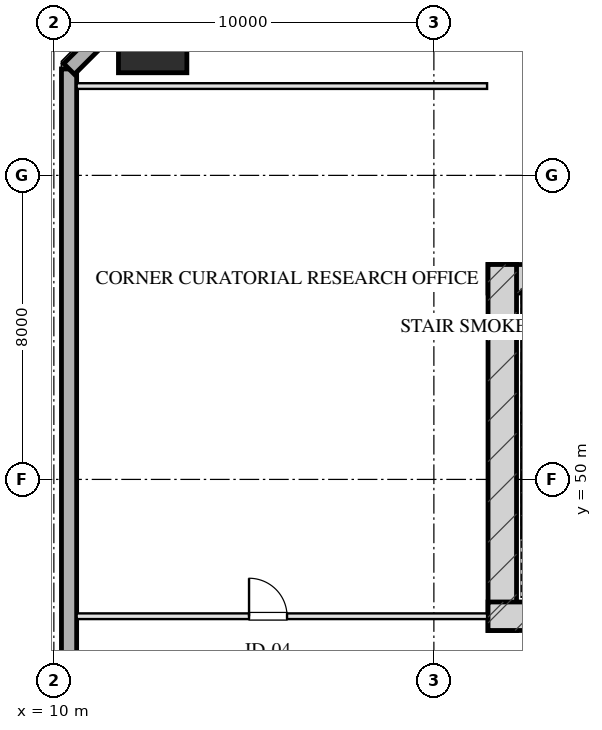
"""IFC4 building model, lengths in metres.
Left out: names, types, materials, properties, quantities, classifications, styles, units other than length and angle.
Written with IfcOpenShell. Run it as: python <this file> out.ifc"""

import sys

from ifc_helpers import new_model, si_unit, direction, frame, frame_2d, origin, origin_2d, place, context, subcontext, project, spatial, rectangle, hollow_rectangle, extrude, element, fill, save


model = new_model("IFC4")
c1 = context("Model", 3, precision=1e-05, world=origin(), true_north=direction((0.0, 1.0)))
c2 = subcontext(c1, "Body", "Model", "MODEL_VIEW")
j1 = project(units=[si_unit("LENGTHUNIT", "METRE"), si_unit("PLANEANGLEUNIT", "RADIAN")], contexts=[c1])
p1 = place(None, origin())
s1 = spatial("IfcSite", under=j1, at=p1, CompositionType="ELEMENT")
p2 = place(p1, origin())
s2 = spatial("IfcBuilding", under=s1, at=p2, CompositionType="ELEMENT")
p3 = place(p2, frame((0.0, 0.0, 42.0)))
s3 = spatial("IfcBuildingStorey", under=s2, at=p3, CompositionType="ELEMENT", Elevation=42.0)
p4 = place(p3, frame((21.425, 55.28, 0.0), z_axis=(0.0, 0.0, 1.0), x_axis=(1.0, 0.0, 0.0)))
e1 = element("IfcWall", 1, at=p4, inside=s3, PredefinedType="SHEAR", context=c2, shape_type="SweptSolid", body=[
    extrude(rectangle(XDim=17.15, YDim=0.75, at=frame_2d((8.575, 0.0))), origin(), (0.0, 0.0, 1.0), 4.0),
])
p5 = place(p3, frame((21.8, 46.025, 0.0), z_axis=(0.0, 0.0, 1.0), x_axis=(0.0, 1.0, 0.0)))
e2 = element("IfcWall", 2, at=p5, inside=s3, PredefinedType="SHEAR", context=c2, shape_type="SweptSolid", body=[
    extrude(rectangle(XDim=9.63, YDim=0.75, at=frame_2d((4.815, 0.0))), origin(), (0.0, 0.0, 1.0), 4.0),
])
p6 = place(p3, frame((21.425, 46.4, 0.0), z_axis=(0.0, 0.0, 1.0), x_axis=(1.0, 0.0, 0.0)))
e3 = element("IfcWall", 3, at=p6, inside=s3, PredefinedType="SHEAR", context=c2, shape_type="SweptSolid", body=[
    extrude(rectangle(XDim=4.295, YDim=0.75, at=frame_2d((2.147, 0.0))), origin(), (0.0, 0.0, 1.0), 4.0),
])
p7 = place(p3, frame((12.6, 61.6, 0.0), z_axis=(0.0, 0.0, 1.0), x_axis=(1.0, 0.0, 0.0)))
e4 = element("IfcColumn", 4, at=p7, inside=s3, PredefinedType="COLUMN", context=c2, shape_type="SweptSolid", body=[
    extrude(hollow_rectangle(XDim=1.8, YDim=1.8, WallThickness=0.06, at=origin_2d()), origin(), (0.0, 0.0, 1.0), 4.001),
])
p8 = place(p3, frame((10.4, 7.2, 0.0), z_axis=(0.0, 0.0, 1.0), x_axis=(0.0, 1.0, 0.0)))
e5 = element("IfcWall", 5, at=p8, inside=s3, PredefinedType="SOLIDWALL", context=c2, shape_type="SweptSolid", body=[
    extrude(rectangle(XDim=53.6, YDim=0.4, at=frame_2d((26.8, 0.0))), origin(), (0.0, 0.0, 1.0), 3.1),
])
p9 = place(p8, frame((28.15, 0.0, 0.75)))
e6 = element("IfcOpeningElement", 6, at=p9, cuts=e5, PredefinedType="OPENING", context=c2, shape_type="SweptSolid", body=[
    extrude(rectangle(XDim=2.5, YDim=1.75, at=frame_2d((1.25, 0.875))), frame((0.0, 0.21, 0.0), z_axis=(0.0, -1.0, 0.0), x_axis=(1.0, 0.0, 0.0)), (0.0, 0.0, 1.0), 0.42),
])
p10 = place(p3, frame((10.4, 60.8, 0.0), z_axis=(0.0, 0.0, 1.0), x_axis=(0.707106781187, 0.707106781187, 0.0)))
e7 = element("IfcWall", 7, at=p10, inside=s3, PredefinedType="SOLIDWALL", context=c2, shape_type="SweptSolid", body=[
    extrude(rectangle(XDim=4.243, YDim=0.4, at=frame_2d((2.121, 0.0))), origin(), (0.0, 0.0, 1.0), 3.1),
])
p11 = place(p3, frame((10.6, 60.35, 0.0), z_axis=(0.0, 0.0, 1.0), x_axis=(1.0, 0.0, 0.0)))
e8 = element("IfcWall", 8, at=p11, inside=s3, PredefinedType="PARTITIONING", context=c2, shape_type="SweptSolid", body=[
    extrude(rectangle(XDim=10.8, YDim=0.15, at=frame_2d((5.4, 0.0))), origin(), (0.0, 0.0, 1.0), 3.705),
])
p12 = place(p3, frame((10.6, 46.4, 0.0), z_axis=(0.0, 0.0, 1.0), x_axis=(1.0, 0.0, 0.0)))
e9 = element("IfcWall", 9, at=p12, inside=s3, PredefinedType="PARTITIONING", context=c2, shape_type="SweptSolid", body=[
    extrude(rectangle(XDim=10.8, YDim=0.15, at=frame_2d((5.4, 0.0))), origin(), (0.0, 0.0, 1.0), 3.705),
])
p13 = place(p12, frame((4.536, 0.0, 0.0)))
e10 = element("IfcOpeningElement", 10, at=p13, cuts=e9, PredefinedType="OPENING", context=c2, shape_type="SweptSolid", body=[
    extrude(rectangle(XDim=1.0, YDim=2.05, at=frame_2d((0.5, 1.025))), frame((0.0, 0.085, 0.0), z_axis=(0.0, -1.0, 0.0), x_axis=(1.0, 0.0, 0.0)), (0.0, 0.0, 1.0), 0.17),
])
p14 = place(p13, origin())
e11 = element("IfcDoor", 11, at=p14, inside=s3, OperationType="SINGLE_SWING_LEFT", PredefinedType="DOOR", context=c2, shape_type="SweptSolid", body=[
    extrude(rectangle(XDim=1.0, YDim=2.05, at=frame_2d((0.5, 1.025))), frame((0.0, 0.025, 0.0), z_axis=(0.0, -1.0, 0.0), x_axis=(1.0, 0.0, 0.0)), (0.0, 0.0, 1.0), 0.05),
])
fill(e10, e11)
save(model, sys.argv[1])
